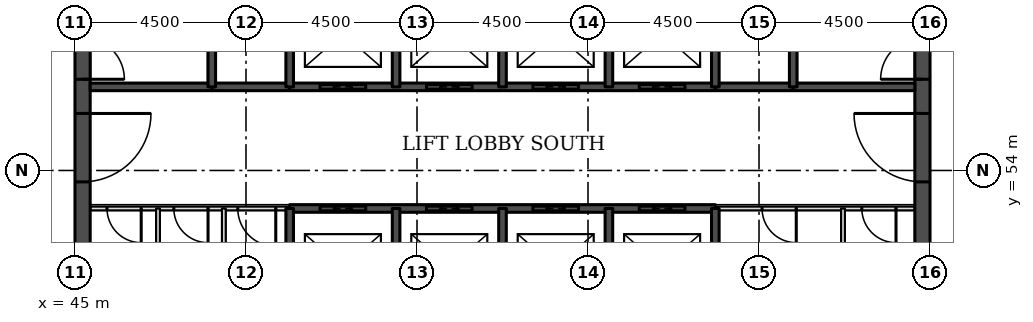
"""IFC4 building model, lengths in metres.
Left out: names, types, materials, properties, quantities, classifications, styles, units other than length and angle.
Written with IfcOpenShell. Run it as: python <this file> out.ifc"""

import sys

from ifc_helpers import new_model, si_unit, direction, frame, frame_2d, origin, place, context, subcontext, project, spatial, rectangle, extrude, element, fill, save


model = new_model("IFC4")
c1 = context("Model", 3, precision=1e-05, world=origin(), true_north=direction((0.0, 1.0)))
c2 = subcontext(c1, "Body", "Model", "MODEL_VIEW")
j1 = project(units=[si_unit("LENGTHUNIT", "METRE"), si_unit("PLANEANGLEUNIT", "RADIAN")], contexts=[c1])
p1 = place(None, origin())
s1 = spatial("IfcSite", under=j1, at=p1, CompositionType="ELEMENT")
p2 = place(p1, origin())
s2 = spatial("IfcBuilding", under=s1, at=p2, CompositionType="ELEMENT")
p3 = place(p2, frame((0.0, 0.0, 143.1)))
s3 = spatial("IfcBuildingStorey", under=s2, at=p3, CompositionType="ELEMENT", Elevation=143.1)
p4 = place(p3, frame((45.2, 49.5, 0.0), z_axis=(0.0, 0.0, 1.0), x_axis=(0.0, 1.0, 0.0)))
e1 = element("IfcWall", 1, at=p4, inside=s3, PredefinedType="SHEAR", context=c2, shape_type="SweptSolid", body=[
    extrude(rectangle(XDim=22.5, YDim=0.4, at=frame_2d((11.25, 0.0))), origin(), (0.0, 0.0, 1.0), 4.6),
])
p5 = place(p4, frame((4.2, 0.0, 0.0)))
e2 = element("IfcOpeningElement", 2, at=p5, cuts=e1, PredefinedType="OPENING", context=c2, shape_type="SweptSolid", body=[
    extrude(rectangle(XDim=1.8, YDim=2.1, at=frame_2d((0.9, 1.05))), frame((0.0, 0.21, 0.0), z_axis=(0.0, -1.0, 0.0), x_axis=(1.0, 0.0, 0.0)), (0.0, 0.0, 1.0), 0.42),
])
p6 = place(p4, frame((6.9, 0.0, 0.0)))
e3 = element("IfcOpeningElement", 3, at=p6, cuts=e1, PredefinedType="OPENING", context=c2, shape_type="SweptSolid", body=[
    extrude(rectangle(XDim=1.1, YDim=2.1, at=frame_2d((0.55, 1.05))), frame((0.0, 0.21, 0.0), z_axis=(0.0, -1.0, 0.0), x_axis=(1.0, 0.0, 0.0)), (0.0, 0.0, 1.0), 0.42),
])
p7 = place(p4, frame((13.6, 0.0, 0.0)))
e4 = element("IfcOpeningElement", 4, at=p7, cuts=e1, PredefinedType="OPENING", context=c2, shape_type="SweptSolid", body=[
    extrude(rectangle(XDim=1.1, YDim=2.1, at=frame_2d((0.55, 1.05))), frame((0.0, 0.21, 0.0), z_axis=(0.0, -1.0, 0.0), x_axis=(1.0, 0.0, 0.0)), (0.0, 0.0, 1.0), 0.42),
])
p8 = place(p4, frame((16.5, 0.0, 0.0)))
e5 = element("IfcOpeningElement", 5, at=p8, cuts=e1, PredefinedType="OPENING", context=c2, shape_type="SweptSolid", body=[
    extrude(rectangle(XDim=1.8, YDim=2.1, at=frame_2d((0.9, 1.05))), frame((0.0, 0.21, 0.0), z_axis=(0.0, -1.0, 0.0), x_axis=(1.0, 0.0, 0.0)), (0.0, 0.0, 1.0), 0.42),
])
p9 = place(p3, frame((67.3, 49.5, 0.0), z_axis=(0.0, 0.0, 1.0), x_axis=(0.0, 1.0, 0.0)))
e6 = element("IfcWall", 6, at=p9, inside=s3, PredefinedType="SHEAR", context=c2, shape_type="SweptSolid", body=[
    extrude(rectangle(XDim=22.5, YDim=0.4, at=frame_2d((11.25, 0.0))), origin(), (0.0, 0.0, 1.0), 4.6),
])
p10 = place(p9, frame((4.2, 0.0, 0.0)))
e7 = element("IfcOpeningElement", 7, at=p10, cuts=e6, PredefinedType="OPENING", context=c2, shape_type="SweptSolid", body=[
    extrude(rectangle(XDim=1.8, YDim=2.1, at=frame_2d((0.9, 1.05))), frame((0.0, 0.21, 0.0), z_axis=(0.0, -1.0, 0.0), x_axis=(1.0, 0.0, 0.0)), (0.0, 0.0, 1.0), 0.42),
])
p11 = place(p9, frame((6.9, 0.0, 0.0)))
e8 = element("IfcOpeningElement", 8, at=p11, cuts=e6, PredefinedType="OPENING", context=c2, shape_type="SweptSolid", body=[
    extrude(rectangle(XDim=1.1, YDim=2.1, at=frame_2d((0.55, 1.05))), frame((0.0, 0.21, 0.0), z_axis=(0.0, -1.0, 0.0), x_axis=(1.0, 0.0, 0.0)), (0.0, 0.0, 1.0), 0.42),
])
p12 = place(p9, frame((13.6, 0.0, 0.0)))
e9 = element("IfcOpeningElement", 9, at=p12, cuts=e6, PredefinedType="OPENING", context=c2, shape_type="SweptSolid", body=[
    extrude(rectangle(XDim=1.1, YDim=2.1, at=frame_2d((0.55, 1.05))), frame((0.0, 0.21, 0.0), z_axis=(0.0, -1.0, 0.0), x_axis=(1.0, 0.0, 0.0)), (0.0, 0.0, 1.0), 0.42),
])
p13 = place(p9, frame((16.5, 0.0, 0.0)))
e10 = element("IfcOpeningElement", 10, at=p13, cuts=e6, PredefinedType="OPENING", context=c2, shape_type="SweptSolid", body=[
    extrude(rectangle(XDim=1.8, YDim=2.1, at=frame_2d((0.9, 1.05))), frame((0.0, 0.21, 0.0), z_axis=(0.0, -1.0, 0.0), x_axis=(1.0, 0.0, 0.0)), (0.0, 0.0, 1.0), 0.42),
])
p14 = place(p3, frame((45.4, 53.0, 0.0), z_axis=(0.0, 0.0, 1.0), x_axis=(1.0, 0.0, 0.0)))
e11 = element("IfcWall", 11, at=p14, inside=s3, PredefinedType="PARTITIONING", context=c2, shape_type="SweptSolid", body=[
    extrude(rectangle(XDim=5.25, YDim=0.1, at=frame_2d((2.625, 0.0))), origin(), (0.0, 0.0, 1.0), 4.45),
])
p15 = place(p14, frame((0.442, 0.0, 0.0)))
e12 = element("IfcOpeningElement", 12, at=p15, cuts=e11, PredefinedType="OPENING", context=c2, shape_type="SweptSolid", body=[
    extrude(rectangle(XDim=0.9, YDim=2.1, at=frame_2d((0.45, 1.05))), frame((0.0, 0.06, 0.0), z_axis=(0.0, -1.0, 0.0), x_axis=(1.0, 0.0, 0.0)), (0.0, 0.0, 1.0), 0.12),
])
p16 = place(p14, frame((2.201, 0.0, 0.0)))
e13 = element("IfcOpeningElement", 13, at=p16, cuts=e11, PredefinedType="OPENING", context=c2, shape_type="SweptSolid", body=[
    extrude(rectangle(XDim=0.9, YDim=2.1, at=frame_2d((0.45, 1.05))), frame((0.0, 0.06, 0.0), z_axis=(0.0, -1.0, 0.0), x_axis=(1.0, 0.0, 0.0)), (0.0, 0.0, 1.0), 0.12),
])
p17 = place(p14, frame((3.884, 0.0, 0.0)))
e14 = element("IfcOpeningElement", 14, at=p17, cuts=e11, PredefinedType="OPENING", context=c2, shape_type="SweptSolid", body=[
    extrude(rectangle(XDim=1.0, YDim=2.1, at=frame_2d((0.5, 1.05))), frame((0.0, 0.06, 0.0), z_axis=(0.0, -1.0, 0.0), x_axis=(1.0, 0.0, 0.0)), (0.0, 0.0, 1.0), 0.12),
])
p18 = place(p3, frame((61.85, 53.0, 0.0), z_axis=(0.0, 0.0, 1.0), x_axis=(1.0, 0.0, 0.0)))
e15 = element("IfcWall", 15, at=p18, inside=s3, PredefinedType="PARTITIONING", context=c2, shape_type="SweptSolid", body=[
    extrude(rectangle(XDim=5.25, YDim=0.1, at=frame_2d((2.625, 0.0))), origin(), (0.0, 0.0, 1.0), 4.45),
])
p19 = place(p18, frame((3.855, 0.0, 0.0)))
e16 = element("IfcOpeningElement", 16, at=p19, cuts=e15, PredefinedType="OPENING", context=c2, shape_type="SweptSolid", body=[
    extrude(rectangle(XDim=0.9, YDim=2.1, at=frame_2d((0.45, 1.05))), frame((0.0, 0.06, 0.0), z_axis=(0.0, -1.0, 0.0), x_axis=(1.0, 0.0, 0.0)), (0.0, 0.0, 1.0), 0.12),
])
p20 = place(p18, frame((1.23, 0.0, 0.0)))
e17 = element("IfcOpeningElement", 17, at=p20, cuts=e15, PredefinedType="OPENING", context=c2, shape_type="SweptSolid", body=[
    extrude(rectangle(XDim=0.9, YDim=2.1, at=frame_2d((0.45, 1.05))), frame((0.0, 0.06, 0.0), z_axis=(0.0, -1.0, 0.0), x_axis=(1.0, 0.0, 0.0)), (0.0, 0.0, 1.0), 0.12),
])
p21 = place(p3, frame((50.65, 53.0, 0.0), z_axis=(0.0, 0.0, 1.0), x_axis=(1.0, 0.0, 0.0)))
e18 = element("IfcWall", 18, at=p21, inside=s3, PredefinedType="SOLIDWALL", context=c2, shape_type="SweptSolid", body=[
    extrude(rectangle(XDim=11.2, YDim=0.2, at=frame_2d((5.6, 0.0))), origin(), (0.0, 0.0, 1.0), 4.45),
])
p22 = place(p21, frame((0.8, 0.0, 0.0)))
e19 = element("IfcOpeningElement", 19, at=p22, cuts=e18, PredefinedType="OPENING", context=c2, shape_type="SweptSolid", body=[
    extrude(rectangle(XDim=1.2, YDim=2.1, at=frame_2d((0.6, 1.05))), frame((0.0, 0.11, 0.0), z_axis=(0.0, -1.0, 0.0), x_axis=(1.0, 0.0, 0.0)), (0.0, 0.0, 1.0), 0.22),
])
p23 = place(p21, frame((3.6, 0.0, 0.0)))
e20 = element("IfcOpeningElement", 20, at=p23, cuts=e18, PredefinedType="OPENING", context=c2, shape_type="SweptSolid", body=[
    extrude(rectangle(XDim=1.2, YDim=2.1, at=frame_2d((0.6, 1.05))), frame((0.0, 0.11, 0.0), z_axis=(0.0, -1.0, 0.0), x_axis=(1.0, 0.0, 0.0)), (0.0, 0.0, 1.0), 0.22),
])
p24 = place(p21, frame((6.4, 0.0, 0.0)))
e21 = element("IfcOpeningElement", 21, at=p24, cuts=e18, PredefinedType="OPENING", context=c2, shape_type="SweptSolid", body=[
    extrude(rectangle(XDim=1.2, YDim=2.1, at=frame_2d((0.6, 1.05))), frame((0.0, 0.11, 0.0), z_axis=(0.0, -1.0, 0.0), x_axis=(1.0, 0.0, 0.0)), (0.0, 0.0, 1.0), 0.22),
])
p25 = place(p21, frame((9.2, 0.0, 0.0)))
e22 = element("IfcOpeningElement", 22, at=p25, cuts=e18, PredefinedType="OPENING", context=c2, shape_type="SweptSolid", body=[
    extrude(rectangle(XDim=1.2, YDim=2.1, at=frame_2d((0.6, 1.05))), frame((0.0, 0.11, 0.0), z_axis=(0.0, -1.0, 0.0), x_axis=(1.0, 0.0, 0.0)), (0.0, 0.0, 1.0), 0.22),
])
for number, where, z_axis, x_axis in (
    (23, (48.6, 56.2, 0.0), (0.0, 0.0, 1.0), (1.0, 0.0, 0.0)),
    (24, (61.85, 56.2, 0.0), (0.0, 0.0, 1.0), (1.0, 0.0, 0.0)),
):
    element("IfcWall", number, at=place(p3, frame(where, z_axis=z_axis, x_axis=x_axis)), inside=s3, PredefinedType="SOLIDWALL", context=c2, shape_type="SweptSolid", body=[
        extrude(rectangle(XDim=2.05, YDim=0.2, at=frame_2d((1.025, 0.0))), origin(), (0.0, 0.0, 1.0), 4.45),
    ])
p26 = place(p3, frame((45.4, 56.2, 0.0), z_axis=(0.0, 0.0, 1.0), x_axis=(1.0, 0.0, 0.0)))
e25 = element("IfcWall", 25, at=p26, inside=s3, PredefinedType="SOLIDWALL", context=c2, shape_type="SweptSolid", body=[
    extrude(rectangle(XDim=3.2, YDim=0.2, at=frame_2d((1.6, 0.0))), origin(), (0.0, 0.0, 1.0), 4.45),
])
p27 = place(p3, frame((50.65, 56.2, 0.0), z_axis=(0.0, 0.0, 1.0), x_axis=(1.0, 0.0, 0.0)))
e26 = element("IfcWall", 26, at=p27, inside=s3, PredefinedType="SOLIDWALL", context=c2, shape_type="SweptSolid", body=[
    extrude(rectangle(XDim=11.2, YDim=0.2, at=frame_2d((5.6, 0.0))), origin(), (0.0, 0.0, 1.0), 4.45),
])
p28 = place(p27, frame((0.8, 0.0, 0.0)))
e27 = element("IfcOpeningElement", 27, at=p28, cuts=e26, PredefinedType="OPENING", context=c2, shape_type="SweptSolid", body=[
    extrude(rectangle(XDim=1.2, YDim=2.1, at=frame_2d((0.6, 1.05))), frame((0.0, 0.11, 0.0), z_axis=(0.0, -1.0, 0.0), x_axis=(1.0, 0.0, 0.0)), (0.0, 0.0, 1.0), 0.22),
])
p29 = place(p27, frame((3.6, 0.0, 0.0)))
e28 = element("IfcOpeningElement", 28, at=p29, cuts=e26, PredefinedType="OPENING", context=c2, shape_type="SweptSolid", body=[
    extrude(rectangle(XDim=1.2, YDim=2.1, at=frame_2d((0.6, 1.05))), frame((0.0, 0.11, 0.0), z_axis=(0.0, -1.0, 0.0), x_axis=(1.0, 0.0, 0.0)), (0.0, 0.0, 1.0), 0.22),
])
p30 = place(p27, frame((6.4, 0.0, 0.0)))
e29 = element("IfcOpeningElement", 29, at=p30, cuts=e26, PredefinedType="OPENING", context=c2, shape_type="SweptSolid", body=[
    extrude(rectangle(XDim=1.2, YDim=2.1, at=frame_2d((0.6, 1.05))), frame((0.0, 0.11, 0.0), z_axis=(0.0, -1.0, 0.0), x_axis=(1.0, 0.0, 0.0)), (0.0, 0.0, 1.0), 0.22),
])
p31 = place(p27, frame((9.2, 0.0, 0.0)))
e30 = element("IfcOpeningElement", 30, at=p31, cuts=e26, PredefinedType="OPENING", context=c2, shape_type="SweptSolid", body=[
    extrude(rectangle(XDim=1.2, YDim=2.1, at=frame_2d((0.6, 1.05))), frame((0.0, 0.11, 0.0), z_axis=(0.0, -1.0, 0.0), x_axis=(1.0, 0.0, 0.0)), (0.0, 0.0, 1.0), 0.22),
])
p32 = place(p3, frame((63.9, 56.2, 0.0), z_axis=(0.0, 0.0, 1.0), x_axis=(1.0, 0.0, 0.0)))
e31 = element("IfcWall", 31, at=p32, inside=s3, PredefinedType="SOLIDWALL", context=c2, shape_type="SweptSolid", body=[
    extrude(rectangle(XDim=3.2, YDim=0.2, at=frame_2d((1.6, 0.0))), origin(), (0.0, 0.0, 1.0), 4.45),
])
p33 = place(p3, frame((47.185, 49.9, 0.0), z_axis=(0.0, 0.0, 1.0), x_axis=(0.0, 1.0, 0.0)))
e32 = element("IfcWall", 32, at=p33, inside=s3, PredefinedType="PARTITIONING", context=c2, shape_type="SweptSolid", body=[
    extrude(rectangle(XDim=3.1, YDim=0.1, at=frame_2d((1.55, 0.0))), origin(), (0.0, 0.0, 1.0), 4.45),
])
p34 = place(p3, frame((48.6, 56.2, 0.0), z_axis=(0.0, 0.0, 1.0), x_axis=(0.0, 1.0, 0.0)))
e33 = element("IfcWall", 33, at=p34, inside=s3, PredefinedType="SOLIDWALL", context=c2, shape_type="SweptSolid", body=[
    extrude(rectangle(XDim=5.8, YDim=0.2, at=frame_2d((2.9, 0.0))), origin(), (0.0, 0.0, 1.0), 4.45),
])
p35 = place(p3, frame((48.917, 49.9, 0.0), z_axis=(0.0, 0.0, 1.0), x_axis=(0.0, 1.0, 0.0)))
e34 = element("IfcWall", 34, at=p35, inside=s3, PredefinedType="PARTITIONING", context=c2, shape_type="SweptSolid", body=[
    extrude(rectangle(XDim=3.1, YDim=0.1, at=frame_2d((1.55, 0.0))), origin(), (0.0, 0.0, 1.0), 4.45),
])
p36 = place(p3, frame((50.65, 49.9, 0.0), z_axis=(0.0, 0.0, 1.0), x_axis=(0.0, 1.0, 0.0)))
e35 = element("IfcWall", 35, at=p36, inside=s3, PredefinedType="SOLIDWALL", context=c2, shape_type="SweptSolid", body=[
    extrude(rectangle(XDim=3.1, YDim=0.2, at=frame_2d((1.55, 0.0))), origin(), (0.0, 0.0, 1.0), 4.45),
])
p37 = place(p3, frame((50.65, 56.2, 0.0), z_axis=(0.0, 0.0, 1.0), x_axis=(0.0, 1.0, 0.0)))
e36 = element("IfcWall", 36, at=p37, inside=s3, PredefinedType="SOLIDWALL", context=c2, shape_type="SweptSolid", body=[
    extrude(rectangle(XDim=2.8, YDim=0.2, at=frame_2d((1.4, 0.0))), origin(), (0.0, 0.0, 1.0), 4.45),
])
p38 = place(p3, frame((53.45, 49.9, 0.0), z_axis=(0.0, 0.0, 1.0), x_axis=(0.0, 1.0, 0.0)))
e37 = element("IfcWall", 37, at=p38, inside=s3, PredefinedType="SOLIDWALL", context=c2, shape_type="SweptSolid", body=[
    extrude(rectangle(XDim=3.1, YDim=0.2, at=frame_2d((1.55, 0.0))), origin(), (0.0, 0.0, 1.0), 4.45),
])
p39 = place(p3, frame((53.45, 56.2, 0.0), z_axis=(0.0, 0.0, 1.0), x_axis=(0.0, 1.0, 0.0)))
e38 = element("IfcWall", 38, at=p39, inside=s3, PredefinedType="SOLIDWALL", context=c2, shape_type="SweptSolid", body=[
    extrude(rectangle(XDim=2.8, YDim=0.2, at=frame_2d((1.4, 0.0))), origin(), (0.0, 0.0, 1.0), 4.45),
])
p40 = place(p3, frame((56.25, 49.9, 0.0), z_axis=(0.0, 0.0, 1.0), x_axis=(0.0, 1.0, 0.0)))
e39 = element("IfcWall", 39, at=p40, inside=s3, PredefinedType="SOLIDWALL", context=c2, shape_type="SweptSolid", body=[
    extrude(rectangle(XDim=3.1, YDim=0.2, at=frame_2d((1.55, 0.0))), origin(), (0.0, 0.0, 1.0), 4.45),
])
p41 = place(p3, frame((56.25, 56.2, 0.0), z_axis=(0.0, 0.0, 1.0), x_axis=(0.0, 1.0, 0.0)))
e40 = element("IfcWall", 40, at=p41, inside=s3, PredefinedType="SOLIDWALL", context=c2, shape_type="SweptSolid", body=[
    extrude(rectangle(XDim=2.8, YDim=0.2, at=frame_2d((1.4, 0.0))), origin(), (0.0, 0.0, 1.0), 4.45),
])
p42 = place(p3, frame((59.05, 49.9, 0.0), z_axis=(0.0, 0.0, 1.0), x_axis=(0.0, 1.0, 0.0)))
e41 = element("IfcWall", 41, at=p42, inside=s3, PredefinedType="SOLIDWALL", context=c2, shape_type="SweptSolid", body=[
    extrude(rectangle(XDim=3.1, YDim=0.2, at=frame_2d((1.55, 0.0))), origin(), (0.0, 0.0, 1.0), 4.45),
])
p43 = place(p3, frame((59.05, 56.2, 0.0), z_axis=(0.0, 0.0, 1.0), x_axis=(0.0, 1.0, 0.0)))
e42 = element("IfcWall", 42, at=p43, inside=s3, PredefinedType="SOLIDWALL", context=c2, shape_type="SweptSolid", body=[
    extrude(rectangle(XDim=2.8, YDim=0.2, at=frame_2d((1.4, 0.0))), origin(), (0.0, 0.0, 1.0), 4.45),
])
p44 = place(p3, frame((61.85, 49.9, 0.0), z_axis=(0.0, 0.0, 1.0), x_axis=(0.0, 1.0, 0.0)))
e43 = element("IfcWall", 43, at=p44, inside=s3, PredefinedType="SOLIDWALL", context=c2, shape_type="SweptSolid", body=[
    extrude(rectangle(XDim=3.1, YDim=0.2, at=frame_2d((1.55, 0.0))), origin(), (0.0, 0.0, 1.0), 4.45),
])
p45 = place(p3, frame((61.85, 56.2, 0.0), z_axis=(0.0, 0.0, 1.0), x_axis=(0.0, 1.0, 0.0)))
e44 = element("IfcWall", 44, at=p45, inside=s3, PredefinedType="SOLIDWALL", context=c2, shape_type="SweptSolid", body=[
    extrude(rectangle(XDim=2.8, YDim=0.2, at=frame_2d((1.4, 0.0))), origin(), (0.0, 0.0, 1.0), 4.45),
])
p46 = place(p3, frame((63.9, 56.2, 0.0), z_axis=(0.0, 0.0, 1.0), x_axis=(0.0, 1.0, 0.0)))
e45 = element("IfcWall", 45, at=p46, inside=s3, PredefinedType="SOLIDWALL", context=c2, shape_type="SweptSolid", body=[
    extrude(rectangle(XDim=5.8, YDim=0.2, at=frame_2d((2.9, 0.0))), origin(), (0.0, 0.0, 1.0), 4.45),
])
p47 = place(p3, frame((65.21, 49.9, 0.0), z_axis=(0.0, 0.0, 1.0), x_axis=(0.0, 1.0, 0.0)))
e46 = element("IfcWall", 46, at=p47, inside=s3, PredefinedType="PARTITIONING", context=c2, shape_type="SweptSolid", body=[
    extrude(rectangle(XDim=3.1, YDim=0.1, at=frame_2d((1.55, 0.0))), origin(), (0.0, 0.0, 1.0), 4.45),
])
p48 = place(p22, origin())
e47 = element("IfcDoor", 47, at=p48, inside=s3, OperationType="DOUBLE_DOOR_SLIDING", PredefinedType="DOOR", context=c2, shape_type="SweptSolid", body=[
    extrude(rectangle(XDim=1.2, YDim=2.1, at=frame_2d((0.6, 1.05))), frame((0.0, 0.025, 0.0), z_axis=(0.0, -1.0, 0.0), x_axis=(1.0, 0.0, 0.0)), (0.0, 0.0, 1.0), 0.05),
])
fill(e19, e47)
p49 = place(p23, origin())
e48 = element("IfcDoor", 48, at=p49, inside=s3, OperationType="DOUBLE_DOOR_SLIDING", PredefinedType="DOOR", context=c2, shape_type="SweptSolid", body=[
    extrude(rectangle(XDim=1.2, YDim=2.1, at=frame_2d((0.6, 1.05))), frame((0.0, 0.025, 0.0), z_axis=(0.0, -1.0, 0.0), x_axis=(1.0, 0.0, 0.0)), (0.0, 0.0, 1.0), 0.05),
])
fill(e20, e48)
p50 = place(p24, origin())
e49 = element("IfcDoor", 49, at=p50, inside=s3, OperationType="DOUBLE_DOOR_SLIDING", PredefinedType="DOOR", context=c2, shape_type="SweptSolid", body=[
    extrude(rectangle(XDim=1.2, YDim=2.1, at=frame_2d((0.6, 1.05))), frame((0.0, 0.025, 0.0), z_axis=(0.0, -1.0, 0.0), x_axis=(1.0, 0.0, 0.0)), (0.0, 0.0, 1.0), 0.05),
])
fill(e21, e49)
p51 = place(p25, origin())
e50 = element("IfcDoor", 50, at=p51, inside=s3, OperationType="DOUBLE_DOOR_SLIDING", PredefinedType="DOOR", context=c2, shape_type="SweptSolid", body=[
    extrude(rectangle(XDim=1.2, YDim=2.1, at=frame_2d((0.6, 1.05))), frame((0.0, 0.025, 0.0), z_axis=(0.0, -1.0, 0.0), x_axis=(1.0, 0.0, 0.0)), (0.0, 0.0, 1.0), 0.05),
])
fill(e22, e50)
p52 = place(p28, origin())
e51 = element("IfcDoor", 51, at=p52, inside=s3, OperationType="DOUBLE_DOOR_SLIDING", PredefinedType="DOOR", context=c2, shape_type="SweptSolid", body=[
    extrude(rectangle(XDim=1.2, YDim=2.1, at=frame_2d((0.6, 1.05))), frame((0.0, 0.025, 0.0), z_axis=(0.0, -1.0, 0.0), x_axis=(1.0, 0.0, 0.0)), (0.0, 0.0, 1.0), 0.05),
])
fill(e27, e51)
p53 = place(p29, origin())
e52 = element("IfcDoor", 52, at=p53, inside=s3, OperationType="DOUBLE_DOOR_SLIDING", PredefinedType="DOOR", context=c2, shape_type="SweptSolid", body=[
    extrude(rectangle(XDim=1.2, YDim=2.1, at=frame_2d((0.6, 1.05))), frame((0.0, 0.025, 0.0), z_axis=(0.0, -1.0, 0.0), x_axis=(1.0, 0.0, 0.0)), (0.0, 0.0, 1.0), 0.05),
])
fill(e28, e52)
p54 = place(p30, origin())
e53 = element("IfcDoor", 53, at=p54, inside=s3, OperationType="DOUBLE_DOOR_SLIDING", PredefinedType="DOOR", context=c2, shape_type="SweptSolid", body=[
    extrude(rectangle(XDim=1.2, YDim=2.1, at=frame_2d((0.6, 1.05))), frame((0.0, 0.025, 0.0), z_axis=(0.0, -1.0, 0.0), x_axis=(1.0, 0.0, 0.0)), (0.0, 0.0, 1.0), 0.05),
])
fill(e29, e53)
p55 = place(p31, origin())
e54 = element("IfcDoor", 54, at=p55, inside=s3, OperationType="DOUBLE_DOOR_SLIDING", PredefinedType="DOOR", context=c2, shape_type="SweptSolid", body=[
    extrude(rectangle(XDim=1.2, YDim=2.1, at=frame_2d((0.6, 1.05))), frame((0.0, 0.025, 0.0), z_axis=(0.0, -1.0, 0.0), x_axis=(1.0, 0.0, 0.0)), (0.0, 0.0, 1.0), 0.05),
])
fill(e30, e54)
p56 = place(p5, frame((1.8, 0.0, 0.0), z_axis=(0.0, 0.0, 1.0), x_axis=(-1.0, 0.0, 0.0)))
e55 = element("IfcDoor", 55, at=p56, inside=s3, OperationType="SINGLE_SWING_LEFT", PredefinedType="DOOR", context=c2, shape_type="SweptSolid", body=[
    extrude(rectangle(XDim=1.8, YDim=2.1, at=frame_2d((0.9, 1.05))), frame((0.0, 0.025, 0.0), z_axis=(0.0, -1.0, 0.0), x_axis=(1.0, 0.0, 0.0)), (0.0, 0.0, 1.0), 0.05),
])
fill(e2, e55)
p57 = place(p6, frame((1.1, 0.0, 0.0), z_axis=(0.0, 0.0, 1.0), x_axis=(-1.0, 0.0, 0.0)))
e56 = element("IfcDoor", 56, at=p57, inside=s3, OperationType="SINGLE_SWING_RIGHT", PredefinedType="DOOR", context=c2, shape_type="SweptSolid", body=[
    extrude(rectangle(XDim=1.1, YDim=2.1, at=frame_2d((0.55, 1.05))), frame((0.0, 0.025, 0.0), z_axis=(0.0, -1.0, 0.0), x_axis=(1.0, 0.0, 0.0)), (0.0, 0.0, 1.0), 0.05),
])
fill(e3, e56)
p58 = place(p10, origin())
e57 = element("IfcDoor", 57, at=p58, inside=s3, OperationType="SINGLE_SWING_RIGHT", PredefinedType="DOOR", context=c2, shape_type="SweptSolid", body=[
    extrude(rectangle(XDim=1.8, YDim=2.1, at=frame_2d((0.9, 1.05))), frame((0.0, 0.025, 0.0), z_axis=(0.0, -1.0, 0.0), x_axis=(1.0, 0.0, 0.0)), (0.0, 0.0, 1.0), 0.05),
])
fill(e7, e57)
p59 = place(p11, origin())
e58 = element("IfcDoor", 58, at=p59, inside=s3, OperationType="SINGLE_SWING_LEFT", PredefinedType="DOOR", context=c2, shape_type="SweptSolid", body=[
    extrude(rectangle(XDim=1.1, YDim=2.1, at=frame_2d((0.55, 1.05))), frame((0.0, 0.025, 0.0), z_axis=(0.0, -1.0, 0.0), x_axis=(1.0, 0.0, 0.0)), (0.0, 0.0, 1.0), 0.05),
])
fill(e8, e58)
p60 = place(p19, frame((0.9, 0.0, 0.0), z_axis=(0.0, 0.0, 1.0), x_axis=(-1.0, 0.0, 0.0)))
e59 = element("IfcDoor", 59, at=p60, inside=s3, OperationType="SINGLE_SWING_LEFT", PredefinedType="DOOR", context=c2, shape_type="SweptSolid", body=[
    extrude(rectangle(XDim=0.9, YDim=2.1, at=frame_2d((0.45, 1.05))), frame((0.0, 0.025, 0.0), z_axis=(0.0, -1.0, 0.0), x_axis=(1.0, 0.0, 0.0)), (0.0, 0.0, 1.0), 0.05),
])
fill(e16, e59)
p61 = place(p20, frame((0.9, 0.0, 0.0), z_axis=(0.0, 0.0, 1.0), x_axis=(-1.0, 0.0, 0.0)))
e60 = element("IfcDoor", 60, at=p61, inside=s3, OperationType="SINGLE_SWING_LEFT", PredefinedType="DOOR", context=c2, shape_type="SweptSolid", body=[
    extrude(rectangle(XDim=0.9, YDim=2.1, at=frame_2d((0.45, 1.05))), frame((0.0, 0.025, 0.0), z_axis=(0.0, -1.0, 0.0), x_axis=(1.0, 0.0, 0.0)), (0.0, 0.0, 1.0), 0.05),
])
fill(e17, e60)
p62 = place(p15, frame((0.9, 0.0, 0.0), z_axis=(0.0, 0.0, 1.0), x_axis=(-1.0, 0.0, 0.0)))
e61 = element("IfcDoor", 61, at=p62, inside=s3, OperationType="SINGLE_SWING_LEFT", PredefinedType="DOOR", context=c2, shape_type="SweptSolid", body=[
    extrude(rectangle(XDim=0.9, YDim=2.1, at=frame_2d((0.45, 1.05))), frame((0.0, 0.025, 0.0), z_axis=(0.0, -1.0, 0.0), x_axis=(1.0, 0.0, 0.0)), (0.0, 0.0, 1.0), 0.05),
])
fill(e12, e61)
p63 = place(p16, frame((0.9, 0.0, 0.0), z_axis=(0.0, 0.0, 1.0), x_axis=(-1.0, 0.0, 0.0)))
e62 = element("IfcDoor", 62, at=p63, inside=s3, OperationType="SINGLE_SWING_LEFT", PredefinedType="DOOR", context=c2, shape_type="SweptSolid", body=[
    extrude(rectangle(XDim=0.9, YDim=2.1, at=frame_2d((0.45, 1.05))), frame((0.0, 0.025, 0.0), z_axis=(0.0, -1.0, 0.0), x_axis=(1.0, 0.0, 0.0)), (0.0, 0.0, 1.0), 0.05),
])
fill(e13, e62)
p64 = place(p17, frame((1.0, 0.0, 0.0), z_axis=(0.0, 0.0, 1.0), x_axis=(-1.0, 0.0, 0.0)))
e63 = element("IfcDoor", 63, at=p64, inside=s3, OperationType="SINGLE_SWING_LEFT", PredefinedType="DOOR", context=c2, shape_type="SweptSolid", body=[
    extrude(rectangle(XDim=1.0, YDim=2.1, at=frame_2d((0.5, 1.05))), frame((0.0, 0.025, 0.0), z_axis=(0.0, -1.0, 0.0), x_axis=(1.0, 0.0, 0.0)), (0.0, 0.0, 1.0), 0.05),
])
fill(e14, e63)
save(model, sys.argv[1])
